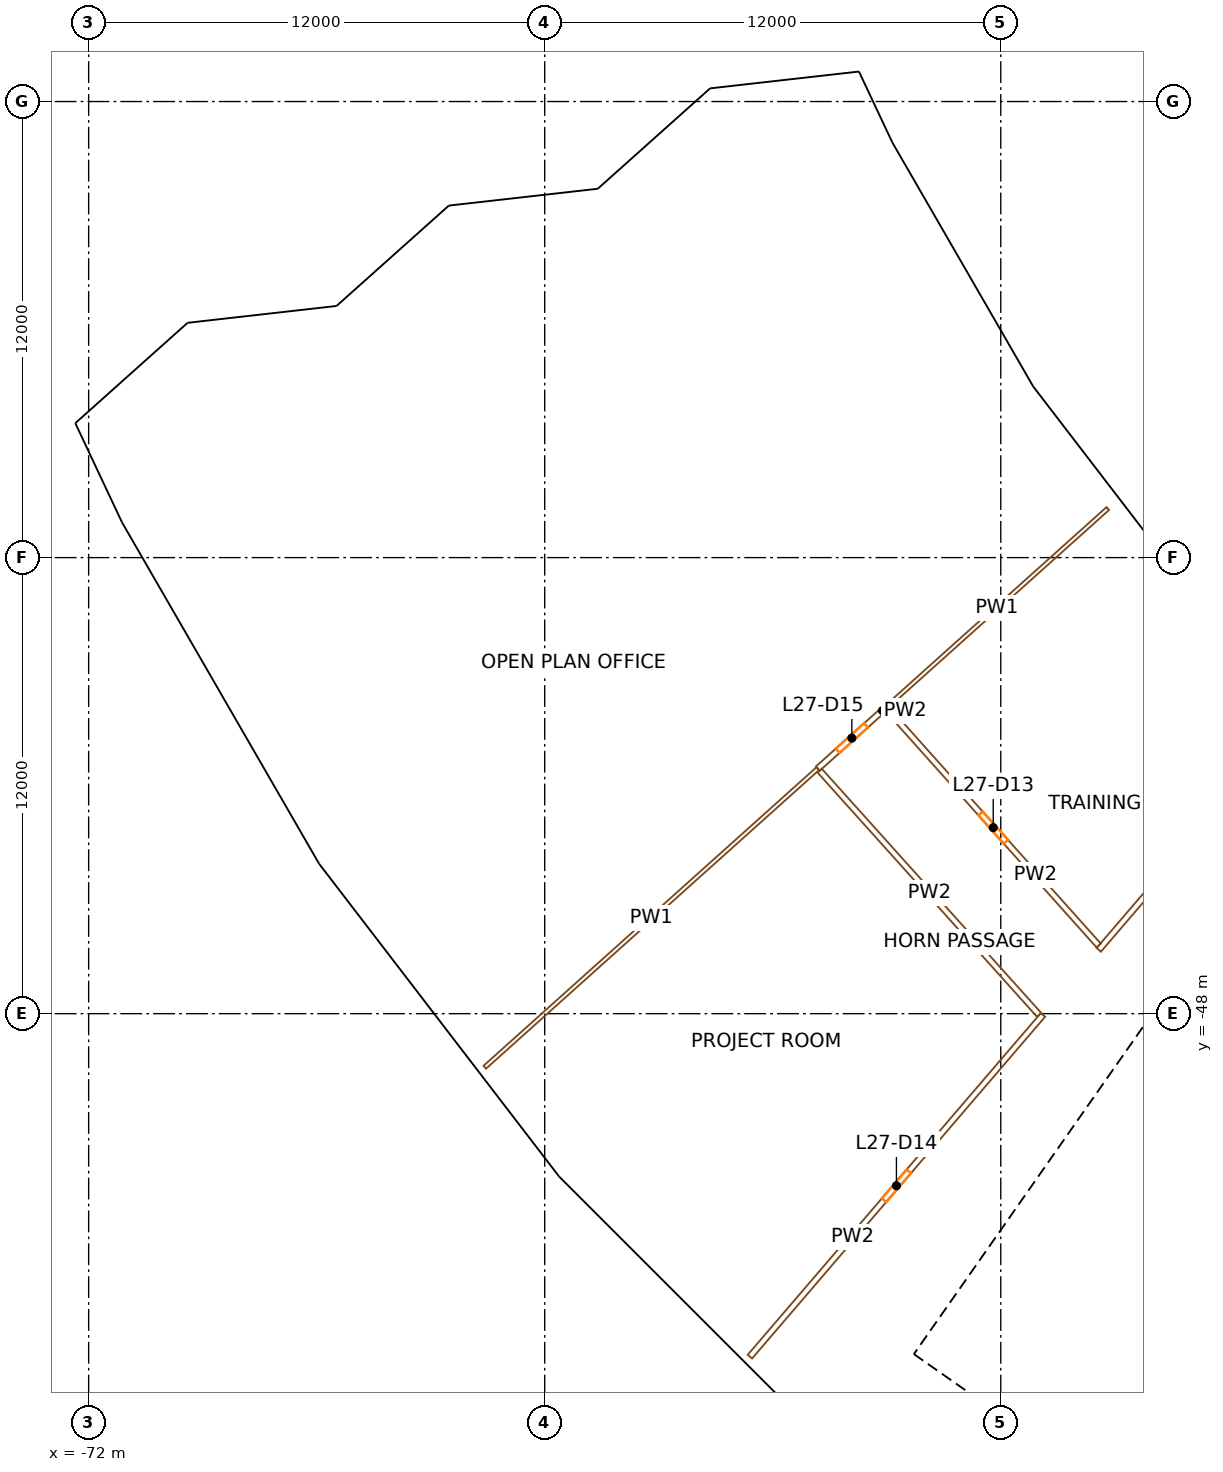
"""IFC4 building model, lengths in metres.
Left out: names, types, materials, properties, quantities, classifications, styles, units other than length and angle.
Written with IfcOpenShell. Run it as: python <this file> out.ifc"""

import sys

from ifc_helpers import new_model, si_unit, direction, frame, frame_2d, origin, origin_2d, place, context, subcontext, project, spatial, rectangle, extrude, element, fill, save


model = new_model("IFC4")
c1 = context("Model", 3, precision=1e-05, world=origin(), true_north=direction((0.0, 1.0)))
c2 = subcontext(c1, "Body", "Model", "MODEL_VIEW")
j1 = project(units=[si_unit("LENGTHUNIT", "METRE"), si_unit("PLANEANGLEUNIT", "RADIAN")], contexts=[c1])
p1 = place(None, origin())
s1 = spatial("IfcSite", under=j1, at=p1, CompositionType="ELEMENT")
p2 = place(p1, origin())
s2 = spatial("IfcBuilding", under=s1, at=p2, CompositionType="ELEMENT")
p3 = place(p2, frame((0.0, 0.0, 121.5)))
s3 = spatial("IfcBuildingStorey", under=s2, at=p3, CompositionType="ELEMENT", Elevation=121.5)
for number, where, z_axis, x_axis in (
    (1, (-52.243, -25.763, 0.0), (0.0, 0.0, 1.0), (0.442, -0.897, 0.0)),
    (2, (-69.732, -34.388, 0.0), (0.0, 0.0, 1.0), (0.442, -0.897, 0.0)),
    (3, (-48.433, -32.362, 0.0), (0.0, 0.0, 1.0), (0.556, -0.831, 0.0)),
    (4, (-64.647, -43.196, 0.0), (0.0, 0.0, 1.0), (0.556, -0.831, 0.0)),
    (5, (-43.795, -38.407, 0.0), (0.0, 0.0, 1.0), (0.659, -0.752, 0.0)),
    (6, (-58.456, -51.264, 0.0), (0.0, 0.0, 1.0), (0.659, -0.752, 0.0)),
    (7, (-51.264, -58.456, 0.0), (0.0, 0.0, 1.0), (0.752, -0.659, 0.0)),
):
    element("IfcColumn", number, at=place(p3, frame(where, z_axis=z_axis, x_axis=x_axis)), inside=s3, PredefinedType="COLUMN", context=c2, shape_type="SweptSolid", body=[
        extrude(rectangle(XDim=1.2, YDim=1.5, at=origin_2d()), origin(), (0.0, 0.0, 1.0), 3.8),
    ])
p4 = place(p3, frame((-49.779, -57.191, 0.0), z_axis=(0.0, 0.0, 1.0), x_axis=(0.573577477574, 0.819151315216, 0.0)))
e8 = element("IfcWall", 8, at=p4, inside=s3, PredefinedType="SHEAR", context=c2, shape_type="SweptSolid", body=[
    extrude(rectangle(XDim=14.8, YDim=0.9, at=frame_2d((7.4, 0.0))), origin(), (0.0, 0.0, 1.0), 3.5),
])
p5 = place(p4, frame((6.7, 0.0, 0.0)))
e9 = element("IfcOpeningElement", 9, at=p5, cuts=e8, PredefinedType="OPENING", context=c2, shape_type="SweptSolid", body=[
    extrude(rectangle(XDim=1.4, YDim=2.1, at=frame_2d((0.7, 1.05))), frame((0.0, 0.46, 0.0), z_axis=(0.0, -1.0, 0.0), x_axis=(1.0, 0.0, 0.0)), (0.0, 0.0, 1.0), 0.92),
])
p6 = place(p3, frame((-36.827, -65.71, 0.0), z_axis=(0.0, 0.0, 1.0), x_axis=(-0.819153391756, 0.573574511963, 0.0)))
e10 = element("IfcWall", 10, at=p6, inside=s3, PredefinedType="SHEAR", context=c2, shape_type="SweptSolid", body=[
    extrude(rectangle(XDim=15.045, YDim=0.9, at=frame_2d((7.523, 0.0))), origin(), (0.0, 0.0, 1.0), 3.5),
])
p7 = place(p6, frame((1.05, 0.0, 0.0)))
e11 = element("IfcOpeningElement", 11, at=p7, cuts=e10, PredefinedType="OPENING", context=c2, shape_type="SweptSolid", body=[
    extrude(rectangle(XDim=1.0, YDim=2.1, at=frame_2d((0.5, 1.05))), frame((0.0, 0.46, 0.0), z_axis=(0.0, -1.0, 0.0), x_axis=(1.0, 0.0, 0.0)), (0.0, 0.0, 1.0), 0.92),
])
p8 = place(p6, frame((3.625, 0.0, 0.0)))
e12 = element("IfcOpeningElement", 12, at=p8, cuts=e10, PredefinedType="OPENING", context=c2, shape_type="SweptSolid", body=[
    extrude(rectangle(XDim=1.0, YDim=2.1, at=frame_2d((0.5, 1.05))), frame((0.0, 0.46, 0.0), z_axis=(0.0, -1.0, 0.0), x_axis=(1.0, 0.0, 0.0)), (0.0, 0.0, 1.0), 0.92),
])
p9 = place(p6, frame((6.075, 0.0, 0.0)))
e13 = element("IfcOpeningElement", 13, at=p9, cuts=e10, PredefinedType="OPENING", context=c2, shape_type="SweptSolid", body=[
    extrude(rectangle(XDim=1.0, YDim=2.1, at=frame_2d((0.5, 1.05))), frame((0.0, 0.46, 0.0), z_axis=(0.0, -1.0, 0.0), x_axis=(1.0, 0.0, 0.0)), (0.0, 0.0, 1.0), 0.92),
])
p10 = place(p6, frame((13.495, 0.0, 0.0)))
e14 = element("IfcOpeningElement", 14, at=p10, cuts=e10, PredefinedType="OPENING", context=c2, shape_type="SweptSolid", body=[
    extrude(rectangle(XDim=1.1, YDim=2.1, at=frame_2d((0.55, 1.05))), frame((0.0, 0.46, 0.0), z_axis=(0.0, -1.0, 0.0), x_axis=(1.0, 0.0, 0.0)), (0.0, 0.0, 1.0), 0.92),
])
p11 = place(p3, frame((-41.262, -57.661, 0.0), z_axis=(0.0, 0.0, 1.0), x_axis=(-0.819164398642, 0.573558792102, 0.0)))
e15 = element("IfcWall", 15, at=p11, inside=s3, PredefinedType="SOLIDWALL", context=c2, shape_type="SweptSolid", body=[
    extrude(rectangle(XDim=6.795, YDim=0.3, at=frame_2d((3.397, 0.0))), origin(), (0.0, 0.0, 1.0), 3.5),
])
p12 = place(p11, frame((5.32, 0.0, 0.0)))
e16 = element("IfcOpeningElement", 16, at=p12, cuts=e15, PredefinedType="OPENING", context=c2, shape_type="SweptSolid", body=[
    extrude(rectangle(XDim=1.1, YDim=2.1, at=frame_2d((0.55, 1.05))), frame((0.0, 0.16, 0.0), z_axis=(0.0, -1.0, 0.0), x_axis=(1.0, 0.0, 0.0)), (0.0, 0.0, 1.0), 0.32),
])
p13 = place(p3, frame((-52.1, -23.454, 0.0), z_axis=(0.0, 0.0, 1.0), x_axis=(-0.993679350529, -0.112255727395, 0.0)))
e17 = element("IfcWall", 17, at=p13, inside=s3, PredefinedType="SOLIDWALL", context=c2, shape_type="SweptSolid", body=[
    extrude(rectangle(XDim=3.275, YDim=0.4, at=frame_2d((1.638, 0.0))), origin(), (0.0, 0.0, 1.0), 2.7),
])
p14 = place(p13, frame((0.638, 0.0, 0.9)))
e18 = element("IfcOpeningElement", 18, at=p14, cuts=e17, PredefinedType="OPENING", context=c2, shape_type="SweptSolid", body=[
    extrude(rectangle(XDim=2.0, YDim=1.425, at=frame_2d((1.0, 0.712))), frame((0.0, 0.21, 0.0), z_axis=(0.0, -1.0, 0.0), x_axis=(1.0, 0.0, 0.0)), (0.0, 0.0, 1.0), 0.42),
])
p15 = place(p3, frame((-55.477, -23.769, 0.0), z_axis=(0.0, 0.0, 1.0), x_axis=(-0.745659792419, -0.666326852206, 0.0)))
e19 = element("IfcWall", 19, at=p15, inside=s3, PredefinedType="SOLIDWALL", context=c2, shape_type="SweptSolid", body=[
    extrude(rectangle(XDim=4.195, YDim=0.4, at=frame_2d((2.097, 0.0))), origin(), (0.0, 0.0, 1.0), 2.7),
])
p16 = place(p15, frame((1.097, 0.0, 0.9)))
e20 = element("IfcOpeningElement", 20, at=p16, cuts=e19, PredefinedType="OPENING", context=c2, shape_type="SweptSolid", body=[
    extrude(rectangle(XDim=2.0, YDim=1.425, at=frame_2d((1.0, 0.712))), frame((0.0, 0.21, 0.0), z_axis=(0.0, -1.0, 0.0), x_axis=(1.0, 0.0, 0.0)), (0.0, 0.0, 1.0), 0.42),
])
p17 = place(p3, frame((-58.727, -26.51, 0.0), z_axis=(0.0, 0.0, 1.0), x_axis=(-0.993669026576, -0.112347076614, 0.0)))
e21 = element("IfcWall", 21, at=p17, inside=s3, PredefinedType="SOLIDWALL", context=c2, shape_type="SweptSolid", body=[
    extrude(rectangle(XDim=3.525, YDim=0.4, at=frame_2d((1.762, 0.0))), origin(), (0.0, 0.0, 1.0), 2.7),
])
p18 = place(p17, frame((0.762, 0.0, 0.9)))
e22 = element("IfcOpeningElement", 22, at=p18, cuts=e21, PredefinedType="OPENING", context=c2, shape_type="SweptSolid", body=[
    extrude(rectangle(XDim=2.0, YDim=1.425, at=frame_2d((1.0, 0.712))), frame((0.0, 0.21, 0.0), z_axis=(0.0, -1.0, 0.0), x_axis=(1.0, 0.0, 0.0)), (0.0, 0.0, 1.0), 0.42),
])
p19 = place(p3, frame((-62.351, -26.853, 0.0), z_axis=(0.0, 0.0, 1.0), x_axis=(-0.745588393591, -0.66640674317, 0.0)))
e23 = element("IfcWall", 23, at=p19, inside=s3, PredefinedType="SOLIDWALL", context=c2, shape_type="SweptSolid", body=[
    extrude(rectangle(XDim=4.193, YDim=0.4, at=frame_2d((2.097, 0.0))), origin(), (0.0, 0.0, 1.0), 2.7),
])
p20 = place(p19, frame((1.097, 0.0, 0.9)))
e24 = element("IfcOpeningElement", 24, at=p20, cuts=e23, PredefinedType="OPENING", context=c2, shape_type="SweptSolid", body=[
    extrude(rectangle(XDim=2.0, YDim=1.425, at=frame_2d((1.0, 0.712))), frame((0.0, 0.21, 0.0), z_axis=(0.0, -1.0, 0.0), x_axis=(1.0, 0.0, 0.0)), (0.0, 0.0, 1.0), 0.42),
])
p21 = place(p3, frame((-65.6, -29.594, 0.0), z_axis=(0.0, 0.0, 1.0), x_axis=(-0.993664791657, -0.11238452661, 0.0)))
e25 = element("IfcWall", 25, at=p21, inside=s3, PredefinedType="SOLIDWALL", context=c2, shape_type="SweptSolid", body=[
    extrude(rectangle(XDim=3.526, YDim=0.4, at=frame_2d((1.763, 0.0))), origin(), (0.0, 0.0, 1.0), 2.7),
])
p22 = place(p21, frame((0.763, 0.0, 0.9)))
e26 = element("IfcOpeningElement", 26, at=p22, cuts=e25, PredefinedType="OPENING", context=c2, shape_type="SweptSolid", body=[
    extrude(rectangle(XDim=2.0, YDim=1.425, at=frame_2d((1.0, 0.712))), frame((0.0, 0.21, 0.0), z_axis=(0.0, -1.0, 0.0), x_axis=(1.0, 0.0, 0.0)), (0.0, 0.0, 1.0), 0.42),
])
p23 = place(p3, frame((-69.225, -29.937, 0.0), z_axis=(0.0, 0.0, 1.0), x_axis=(-0.745540338134, -0.666460504618, 0.0)))
e27 = element("IfcWall", 27, at=p23, inside=s3, PredefinedType="SOLIDWALL", context=c2, shape_type="SweptSolid", body=[
    extrude(rectangle(XDim=4.013, YDim=0.4, at=frame_2d((2.007, 0.0))), origin(), (0.0, 0.0, 1.0), 2.7),
])
p24 = place(p23, frame((1.007, 0.0, 0.9)))
e28 = element("IfcOpeningElement", 28, at=p24, cuts=e27, PredefinedType="OPENING", context=c2, shape_type="SweptSolid", body=[
    extrude(rectangle(XDim=2.0, YDim=1.425, at=frame_2d((1.0, 0.712))), frame((0.0, 0.21, 0.0), z_axis=(0.0, -1.0, 0.0), x_axis=(1.0, 0.0, 0.0)), (0.0, 0.0, 1.0), 0.42),
])
p25 = place(p3, frame((-51.024, -25.184, 0.0), z_axis=(0.0, 0.0, 1.0), x_axis=(-0.425890738809, 0.90477460099, 0.0)))
e29 = element("IfcWall", 29, at=p25, inside=s3, PredefinedType="SOLIDWALL", context=c2, shape_type="SweptSolid", body=[
    extrude(rectangle(XDim=2.133, YDim=0.4, at=frame_2d((1.066, 0.0))), origin(), (0.0, 0.0, 1.0), 2.7),
])
p26 = place(p3, frame((-47.336, -31.568, 0.0), z_axis=(0.0, 0.0, 1.0), x_axis=(-0.499990592807, 0.866030834962, 0.0)))
e30 = element("IfcWall", 30, at=p26, inside=s3, PredefinedType="SOLIDWALL", context=c2, shape_type="SweptSolid", body=[
    extrude(rectangle(XDim=7.356, YDim=0.4, at=frame_2d((3.678, 0.0))), origin(), (0.0, 0.0, 1.0), 2.7),
])
p27 = place(p26, frame((4.225, 0.0, 0.9)))
e31 = element("IfcOpeningElement", 31, at=p27, cuts=e30, PredefinedType="OPENING", context=c2, shape_type="SweptSolid", body=[
    extrude(rectangle(XDim=2.6, YDim=1.65, at=frame_2d((1.3, 0.825))), frame((0.0, 0.21, 0.0), z_axis=(0.0, -1.0, 0.0), x_axis=(1.0, 0.0, 0.0)), (0.0, 0.0, 1.0), 0.42),
])
p28 = place(p26, frame((0.517, 0.0, 0.9)))
e32 = element("IfcOpeningElement", 32, at=p28, cuts=e30, PredefinedType="OPENING", context=c2, shape_type="SweptSolid", body=[
    extrude(rectangle(XDim=2.6, YDim=1.65, at=frame_2d((1.3, 0.825))), frame((0.0, 0.21, 0.0), z_axis=(0.0, -1.0, 0.0), x_axis=(1.0, 0.0, 0.0)), (0.0, 0.0, 1.0), 0.42),
])
p29 = place(p3, frame((-42.765, -37.537, 0.0), z_axis=(0.0, 0.0, 1.0), x_axis=(-0.608748204711, 0.793363487476, 0.0)))
e33 = element("IfcWall", 33, at=p29, inside=s3, PredefinedType="SOLIDWALL", context=c2, shape_type="SweptSolid", body=[
    extrude(rectangle(XDim=7.493, YDim=0.4, at=frame_2d((3.747, 0.0))), origin(), (0.0, 0.0, 1.0), 2.7),
])
p30 = place(p29, frame((4.301, 0.0, 0.9)))
e34 = element("IfcOpeningElement", 34, at=p30, cuts=e33, PredefinedType="OPENING", context=c2, shape_type="SweptSolid", body=[
    extrude(rectangle(XDim=2.6, YDim=1.65, at=frame_2d((1.3, 0.825))), frame((0.0, 0.21, 0.0), z_axis=(0.0, -1.0, 0.0), x_axis=(1.0, 0.0, 0.0)), (0.0, 0.0, 1.0), 0.42),
])
p31 = place(p29, frame((0.592, 0.0, 0.9)))
e35 = element("IfcOpeningElement", 35, at=p31, cuts=e33, PredefinedType="OPENING", context=c2, shape_type="SweptSolid", body=[
    extrude(rectangle(XDim=2.6, YDim=1.65, at=frame_2d((1.3, 0.825))), frame((0.0, 0.21, 0.0), z_axis=(0.0, -1.0, 0.0), x_axis=(1.0, 0.0, 0.0)), (0.0, 0.0, 1.0), 0.42),
])
p32 = place(p3, frame((-61.577, -49.409, 0.0), z_axis=(0.0, 0.0, 1.0), x_axis=(0.744506868351, 0.667614801347, 0.0)))
e36 = element("IfcWall", 36, at=p32, inside=s3, PredefinedType="PARTITIONING", context=c2, shape_type="SweptSolid", body=[
    extrude(rectangle(XDim=11.77, YDim=0.1, at=frame_2d((5.885, 0.0))), origin(), (0.0, 0.0, 1.0), 2.4),
])
p33 = place(p3, frame((-52.814, -41.552, 0.0), z_axis=(0.0, 0.0, 1.0), x_axis=(0.744484183784, 0.667640097729, 0.0)))
e37 = element("IfcWall", 37, at=p33, inside=s3, PredefinedType="PARTITIONING", context=c2, shape_type="SweptSolid", body=[
    extrude(rectangle(XDim=2.405, YDim=0.15, at=frame_2d((1.203, 0.0))), origin(), (0.0, 0.0, 1.0), 2.4),
])
p34 = place(p33, frame((0.703, 0.0, 0.0)))
e38 = element("IfcOpeningElement", 38, at=p34, cuts=e37, PredefinedType="OPENING", context=c2, shape_type="SweptSolid", body=[
    extrude(rectangle(XDim=1.0, YDim=2.1, at=frame_2d((0.5, 1.05))), frame((0.0, 0.085, 0.0), z_axis=(0.0, -1.0, 0.0), x_axis=(1.0, 0.0, 0.0)), (0.0, 0.0, 1.0), 0.17),
])
p35 = place(p3, frame((-51.023, -39.946, 0.0), z_axis=(0.0, 0.0, 1.0), x_axis=(0.744506479511, 0.667615234972, 0.0)))
e39 = element("IfcWall", 39, at=p35, inside=s3, PredefinedType="PARTITIONING", context=c2, shape_type="SweptSolid", body=[
    extrude(rectangle(XDim=7.843, YDim=0.1, at=frame_2d((3.921, 0.0))), origin(), (0.0, 0.0, 1.0), 2.4),
])
p36 = place(p3, frame((-54.601, -57.024, 0.0), z_axis=(0.0, 0.0, 1.0), x_axis=(0.650984855328, 0.759090717986, 0.0)))
e40 = element("IfcWall", 40, at=p36, inside=s3, PredefinedType="PARTITIONING", context=c2, shape_type="SweptSolid", body=[
    extrude(rectangle(XDim=11.845, YDim=0.15, at=frame_2d((5.922, 0.0))), origin(), (0.0, 0.0, 1.0), 2.4),
])
p37 = place(p36, frame((5.423, 0.0, 0.0)))
e41 = element("IfcOpeningElement", 41, at=p37, cuts=e40, PredefinedType="OPENING", context=c2, shape_type="SweptSolid", body=[
    extrude(rectangle(XDim=1.0, YDim=2.1, at=frame_2d((0.5, 1.05))), frame((0.0, 0.085, 0.0), z_axis=(0.0, -1.0, 0.0), x_axis=(1.0, 0.0, 0.0)), (0.0, 0.0, 1.0), 0.17),
])
p38 = place(p3, frame((-46.989, -48.034, 0.0), z_axis=(0.0, 0.0, 1.0), x_axis=(-0.668407219478, 0.743795528993, 0.0)))
e42 = element("IfcWall", 42, at=p38, inside=s3, PredefinedType="PARTITIONING", context=c2, shape_type="SweptSolid", body=[
    extrude(rectangle(XDim=8.64, YDim=0.15, at=frame_2d((4.32, 0.0))), origin(), (0.0, 0.0, 1.0), 2.4),
])
p39 = place(p3, frame((-50.973, -40.002, 0.0), z_axis=(0.0, 0.0, 1.0), x_axis=(0.666630280457, -0.745388535716, 0.0)))
e43 = element("IfcWall", 43, at=p39, inside=s3, PredefinedType="PARTITIONING", context=c2, shape_type="SweptSolid", body=[
    extrude(rectangle(XDim=8.326, YDim=0.15, at=frame_2d((4.163, 0.0))), origin(), (0.0, 0.0, 1.0), 2.4),
])
p40 = place(p39, frame((3.663, 0.0, 0.0)))
e44 = element("IfcOpeningElement", 44, at=p40, cuts=e43, PredefinedType="OPENING", context=c2, shape_type="SweptSolid", body=[
    extrude(rectangle(XDim=1.0, YDim=2.1, at=frame_2d((0.5, 1.05))), frame((0.0, 0.085, 0.0), z_axis=(0.0, -1.0, 0.0), x_axis=(1.0, 0.0, 0.0)), (0.0, 0.0, 1.0), 0.17),
])
p41 = place(p3, frame((-40.268, -40.311, 0.0), z_axis=(0.0, 0.0, 1.0), x_axis=(-0.65098181151, -0.759093328309, 0.0)))
e45 = element("IfcWall", 45, at=p41, inside=s3, PredefinedType="PARTITIONING", context=c2, shape_type="SweptSolid", body=[
    extrude(rectangle(XDim=7.917, YDim=0.15, at=frame_2d((3.958, 0.0))), origin(), (0.0, 0.0, 1.0), 2.4),
])
p42 = place(p5, origin())
e46 = element("IfcDoor", 46, at=p42, inside=s3, OperationType="DOUBLE_DOOR_SINGLE_SWING", PredefinedType="DOOR", context=c2, shape_type="SweptSolid", body=[
    extrude(rectangle(XDim=1.4, YDim=2.1, at=frame_2d((0.7, 1.05))), frame((0.0, 0.025, 0.0), z_axis=(0.0, -1.0, 0.0), x_axis=(1.0, 0.0, 0.0)), (0.0, 0.0, 1.0), 0.05),
])
fill(e9, e46)
p43 = place(p10, origin())
e47 = element("IfcDoor", 47, at=p43, inside=s3, OperationType="SINGLE_SWING_LEFT", PredefinedType="DOOR", context=c2, shape_type="SweptSolid", body=[
    extrude(rectangle(XDim=1.1, YDim=2.1, at=frame_2d((0.55, 1.05))), frame((0.0, 0.025, 0.0), z_axis=(0.0, -1.0, 0.0), x_axis=(1.0, 0.0, 0.0)), (0.0, 0.0, 1.0), 0.05),
])
fill(e14, e47)
p44 = place(p12, origin())
e48 = element("IfcDoor", 48, at=p44, inside=s3, OperationType="SINGLE_SWING_RIGHT", PredefinedType="DOOR", context=c2, shape_type="SweptSolid", body=[
    extrude(rectangle(XDim=1.1, YDim=2.1, at=frame_2d((0.55, 1.05))), frame((0.0, 0.025, 0.0), z_axis=(0.0, -1.0, 0.0), x_axis=(1.0, 0.0, 0.0)), (0.0, 0.0, 1.0), 0.05),
])
fill(e16, e48)
p45 = place(p27, origin())
e49 = element("IfcWindow", 49, at=p45, inside=s3, PartitioningType="SINGLE_PANEL", PredefinedType="WINDOW", context=c2, shape_type="SweptSolid", body=[
    extrude(rectangle(XDim=2.6, YDim=1.65, at=frame_2d((1.3, 0.825))), frame((0.0, 0.03, 0.0), z_axis=(0.0, -1.0, 0.0), x_axis=(1.0, 0.0, 0.0)), (0.0, 0.0, 1.0), 0.06),
])
fill(e31, e49)
p46 = place(p28, origin())
e50 = element("IfcWindow", 50, at=p46, inside=s3, PartitioningType="SINGLE_PANEL", PredefinedType="WINDOW", context=c2, shape_type="SweptSolid", body=[
    extrude(rectangle(XDim=2.6, YDim=1.65, at=frame_2d((1.3, 0.825))), frame((0.0, 0.03, 0.0), z_axis=(0.0, -1.0, 0.0), x_axis=(1.0, 0.0, 0.0)), (0.0, 0.0, 1.0), 0.06),
])
fill(e32, e50)
p47 = place(p30, origin())
e51 = element("IfcWindow", 51, at=p47, inside=s3, PartitioningType="SINGLE_PANEL", PredefinedType="WINDOW", context=c2, shape_type="SweptSolid", body=[
    extrude(rectangle(XDim=2.6, YDim=1.65, at=frame_2d((1.3, 0.825))), frame((0.0, 0.03, 0.0), z_axis=(0.0, -1.0, 0.0), x_axis=(1.0, 0.0, 0.0)), (0.0, 0.0, 1.0), 0.06),
])
fill(e34, e51)
p48 = place(p31, origin())
e52 = element("IfcWindow", 52, at=p48, inside=s3, PartitioningType="SINGLE_PANEL", PredefinedType="WINDOW", context=c2, shape_type="SweptSolid", body=[
    extrude(rectangle(XDim=2.6, YDim=1.65, at=frame_2d((1.3, 0.825))), frame((0.0, 0.03, 0.0), z_axis=(0.0, -1.0, 0.0), x_axis=(1.0, 0.0, 0.0)), (0.0, 0.0, 1.0), 0.06),
])
fill(e35, e52)
p49 = place(p14, origin())
e53 = element("IfcWindow", 53, at=p49, inside=s3, PartitioningType="SINGLE_PANEL", PredefinedType="WINDOW", context=c2, shape_type="SweptSolid", body=[
    extrude(rectangle(XDim=2.0, YDim=1.425, at=frame_2d((1.0, 0.712))), frame((0.0, 0.03, 0.0), z_axis=(0.0, -1.0, 0.0), x_axis=(1.0, 0.0, 0.0)), (0.0, 0.0, 1.0), 0.06),
])
fill(e18, e53)
p50 = place(p16, origin())
e54 = element("IfcWindow", 54, at=p50, inside=s3, PartitioningType="SINGLE_PANEL", PredefinedType="WINDOW", context=c2, shape_type="SweptSolid", body=[
    extrude(rectangle(XDim=2.0, YDim=1.425, at=frame_2d((1.0, 0.712))), frame((0.0, 0.03, 0.0), z_axis=(0.0, -1.0, 0.0), x_axis=(1.0, 0.0, 0.0)), (0.0, 0.0, 1.0), 0.06),
])
fill(e20, e54)
p51 = place(p18, origin())
e55 = element("IfcWindow", 55, at=p51, inside=s3, PartitioningType="SINGLE_PANEL", PredefinedType="WINDOW", context=c2, shape_type="SweptSolid", body=[
    extrude(rectangle(XDim=2.0, YDim=1.425, at=frame_2d((1.0, 0.712))), frame((0.0, 0.03, 0.0), z_axis=(0.0, -1.0, 0.0), x_axis=(1.0, 0.0, 0.0)), (0.0, 0.0, 1.0), 0.06),
])
fill(e22, e55)
p52 = place(p20, origin())
e56 = element("IfcWindow", 56, at=p52, inside=s3, PartitioningType="SINGLE_PANEL", PredefinedType="WINDOW", context=c2, shape_type="SweptSolid", body=[
    extrude(rectangle(XDim=2.0, YDim=1.425, at=frame_2d((1.0, 0.712))), frame((0.0, 0.03, 0.0), z_axis=(0.0, -1.0, 0.0), x_axis=(1.0, 0.0, 0.0)), (0.0, 0.0, 1.0), 0.06),
])
fill(e24, e56)
p53 = place(p22, origin())
e57 = element("IfcWindow", 57, at=p53, inside=s3, PartitioningType="SINGLE_PANEL", PredefinedType="WINDOW", context=c2, shape_type="SweptSolid", body=[
    extrude(rectangle(XDim=2.0, YDim=1.425, at=frame_2d((1.0, 0.712))), frame((0.0, 0.03, 0.0), z_axis=(0.0, -1.0, 0.0), x_axis=(1.0, 0.0, 0.0)), (0.0, 0.0, 1.0), 0.06),
])
fill(e26, e57)
p54 = place(p24, origin())
e58 = element("IfcWindow", 58, at=p54, inside=s3, PartitioningType="SINGLE_PANEL", PredefinedType="WINDOW", context=c2, shape_type="SweptSolid", body=[
    extrude(rectangle(XDim=2.0, YDim=1.425, at=frame_2d((1.0, 0.712))), frame((0.0, 0.03, 0.0), z_axis=(0.0, -1.0, 0.0), x_axis=(1.0, 0.0, 0.0)), (0.0, 0.0, 1.0), 0.06),
])
fill(e28, e58)
p55 = place(p40, origin())
e59 = element("IfcDoor", 59, at=p55, inside=s3, OperationType="SINGLE_SWING_RIGHT", PredefinedType="DOOR", context=c2, shape_type="SweptSolid", body=[
    extrude(rectangle(XDim=1.0, YDim=2.1, at=frame_2d((0.5, 1.05))), frame((0.0, 0.025, 0.0), z_axis=(0.0, -1.0, 0.0), x_axis=(1.0, 0.0, 0.0)), (0.0, 0.0, 1.0), 0.05),
])
fill(e44, e59)
p56 = place(p37, origin())
e60 = element("IfcDoor", 60, at=p56, inside=s3, OperationType="SINGLE_SWING_RIGHT", PredefinedType="DOOR", context=c2, shape_type="SweptSolid", body=[
    extrude(rectangle(XDim=1.0, YDim=2.1, at=frame_2d((0.5, 1.05))), frame((0.0, 0.025, 0.0), z_axis=(0.0, -1.0, 0.0), x_axis=(1.0, 0.0, 0.0)), (0.0, 0.0, 1.0), 0.05),
])
fill(e41, e60)
p57 = place(p34, origin())
e61 = element("IfcDoor", 61, at=p57, inside=s3, OperationType="SINGLE_SWING_RIGHT", PredefinedType="DOOR", context=c2, shape_type="SweptSolid", body=[
    extrude(rectangle(XDim=1.0, YDim=2.1, at=frame_2d((0.5, 1.05))), frame((0.0, 0.025, 0.0), z_axis=(0.0, -1.0, 0.0), x_axis=(1.0, 0.0, 0.0)), (0.0, 0.0, 1.0), 0.05),
])
fill(e38, e61)
save(model, sys.argv[1])
